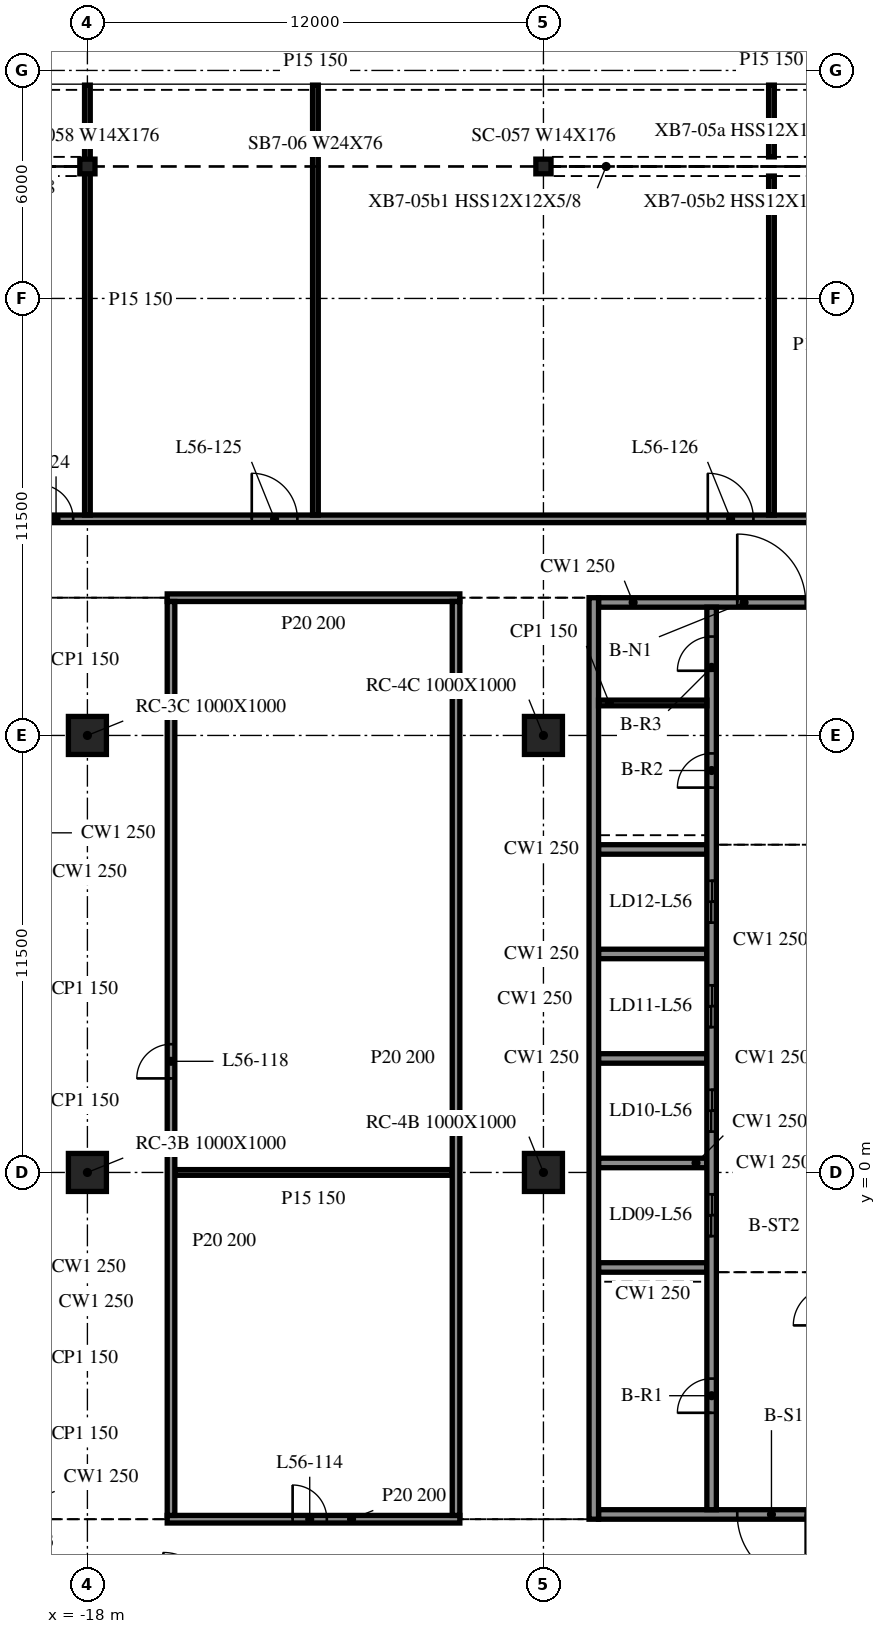
"""IFC4 building model, lengths in metres.
Left out: names, types, materials, properties, quantities, classifications, styles, units other than length and angle.
Written with IfcOpenShell. Run it as: python <this file> out.ifc"""

import sys

from ifc_helpers import new_model, si_unit, direction, frame, frame_2d, origin, origin_2d, place, context, subcontext, project, spatial, rectangle, i_section, extrude, element, fill, save


model = new_model("IFC4")
c1 = context("Model", 3, precision=1e-05, world=origin(), true_north=direction((0.0, 1.0)))
c2 = subcontext(c1, "Body", "Model", "MODEL_VIEW")
j1 = project(units=[si_unit("LENGTHUNIT", "METRE"), si_unit("PLANEANGLEUNIT", "RADIAN")], contexts=[c1])
p1 = place(None, origin())
s1 = spatial("IfcSite", under=j1, at=p1, CompositionType="ELEMENT")
p2 = place(p1, origin())
s2 = spatial("IfcBuilding", under=s1, at=p2, CompositionType="ELEMENT")
p3 = place(p2, frame((0.0, 0.0, 232.4)))
s3 = spatial("IfcBuildingStorey", under=s2, at=p3, CompositionType="ELEMENT", Elevation=232.4)
for number, where, z_axis, x_axis in (
    (1, (-18.0, 0.0, -0.34), (0.0, 0.0, 1.0), (1.0, 0.0, 0.0)),
    (2, (-18.0, 11.5, -0.34), (0.0, 0.0, 1.0), (1.0, 0.0, 0.0)),
    (3, (-6.0, 0.0, -0.34), (0.0, 0.0, 1.0), (1.0, 0.0, 0.0)),
    (4, (-6.0, 11.5, -0.34), (0.0, 0.0, 1.0), (1.0, 0.0, 0.0)),
):
    element("IfcColumn", number, at=place(p3, frame(where, z_axis=z_axis, x_axis=x_axis)), inside=s3, PredefinedType="COLUMN", context=c2, shape_type="SweptSolid", body=[
        extrude(rectangle(XDim=1.0, YDim=1.0, at=origin_2d()), origin(), (0.0, 0.0, 1.0), 3.8),
    ])
for number, where, z_axis, x_axis in (
    (5, (-6.0, 26.473, -0.34), (0.0, 0.0, 1.0), (1.0, 0.0, 0.0)),
    (6, (-18.0, 26.473, -0.34), (0.0, 0.0, 1.0), (1.0, 0.0, 0.0)),
):
    element("IfcColumn", number, at=place(p3, frame(where, z_axis=z_axis, x_axis=x_axis)), inside=s3, PredefinedType="COLUMN", context=c2, shape_type="SweptSolid", body=[
        extrude(i_section(OverallWidth=0.399, OverallDepth=0.386, WebThickness=0.021, FlangeThickness=0.033, at=origin_2d()), origin(), (0.0, 0.0, 1.0), 3.8),
    ])
p4 = place(p3, frame((-4.675, 15.125, 0.0), z_axis=(0.0, 0.0, 1.0), x_axis=(0.0, -1.0, 0.0)))
e7 = element("IfcWall", 7, at=p4, inside=s3, PredefinedType="SOLIDWALL", context=c2, shape_type="SweptSolid", body=[
    extrude(rectangle(XDim=24.25, YDim=0.25, at=frame_2d((12.125, 0.0))), origin(), (0.0, 0.0, 1.0), 3.46),
])
p5 = place(p3, frame((4.55, -9.0, 0.0), z_axis=(0.0, 0.0, 1.0), x_axis=(-1.0, 0.0, 0.0)))
e8 = element("IfcWall", 8, at=p5, inside=s3, PredefinedType="SOLIDWALL", context=c2, shape_type="SweptSolid", body=[
    extrude(rectangle(XDim=9.1, YDim=0.25, at=frame_2d((4.55, 0.0))), origin(), (0.0, 0.0, 1.0), 3.46),
])
p6 = place(p5, frame((3.65, 0.0, 0.0)))
e9 = element("IfcOpeningElement", 9, at=p6, cuts=e8, PredefinedType="OPENING", context=c2, shape_type="SweptSolid", body=[
    extrude(rectangle(XDim=1.8, YDim=2.1, at=frame_2d((0.9, 1.05))), frame((0.0, 0.135, 0.0), z_axis=(0.0, -1.0, 0.0), x_axis=(1.0, 0.0, 0.0)), (0.0, 0.0, 1.0), 0.27),
])
p7 = place(p3, frame((-4.55, 15.0, 0.0), z_axis=(0.0, 0.0, 1.0), x_axis=(1.0, 0.0, 0.0)))
e10 = element("IfcWall", 10, at=p7, inside=s3, PredefinedType="SOLIDWALL", context=c2, shape_type="SweptSolid", body=[
    extrude(rectangle(XDim=9.1, YDim=0.25, at=frame_2d((4.55, 0.0))), origin(), (0.0, 0.0, 1.0), 3.46),
])
p8 = place(p7, frame((3.65, 0.0, 0.0)))
e11 = element("IfcOpeningElement", 11, at=p8, cuts=e10, PredefinedType="OPENING", context=c2, shape_type="SweptSolid", body=[
    extrude(rectangle(XDim=1.8, YDim=2.1, at=frame_2d((0.9, 1.05))), frame((0.0, 0.135, 0.0), z_axis=(0.0, -1.0, 0.0), x_axis=(1.0, 0.0, 0.0)), (0.0, 0.0, 1.0), 0.27),
])
p9 = place(p3, frame((-1.575, -8.875, 0.0), z_axis=(0.0, 0.0, 1.0), x_axis=(0.0, 1.0, 0.0)))
e12 = element("IfcWall", 12, at=p9, inside=s3, PredefinedType="SOLIDWALL", context=c2, shape_type="SweptSolid", body=[
    extrude(rectangle(XDim=23.75, YDim=0.25, at=frame_2d((11.875, 0.0))), origin(), (0.0, 0.0, 1.0), 3.46),
])
p10 = place(p9, frame((7.2, 0.0, 0.0)))
e13 = element("IfcOpeningElement", 13, at=p10, cuts=e12, PredefinedType="OPENING", context=c2, shape_type="SweptSolid", body=[
    extrude(rectangle(XDim=1.1, YDim=2.1, at=frame_2d((0.55, 1.05))), frame((0.0, 0.135, 0.0), z_axis=(0.0, -1.0, 0.0), x_axis=(1.0, 0.0, 0.0)), (0.0, 0.0, 1.0), 0.27),
])
p11 = place(p9, frame((9.95, 0.0, 0.0)))
e14 = element("IfcOpeningElement", 14, at=p11, cuts=e12, PredefinedType="OPENING", context=c2, shape_type="SweptSolid", body=[
    extrude(rectangle(XDim=1.1, YDim=2.1, at=frame_2d((0.55, 1.05))), frame((0.0, 0.135, 0.0), z_axis=(0.0, -1.0, 0.0), x_axis=(1.0, 0.0, 0.0)), (0.0, 0.0, 1.0), 0.27),
])
p12 = place(p9, frame((12.7, 0.0, 0.0)))
e15 = element("IfcOpeningElement", 15, at=p12, cuts=e12, PredefinedType="OPENING", context=c2, shape_type="SweptSolid", body=[
    extrude(rectangle(XDim=1.1, YDim=2.1, at=frame_2d((0.55, 1.05))), frame((0.0, 0.135, 0.0), z_axis=(0.0, -1.0, 0.0), x_axis=(1.0, 0.0, 0.0)), (0.0, 0.0, 1.0), 0.27),
])
p13 = place(p9, frame((15.45, 0.0, 0.0)))
e16 = element("IfcOpeningElement", 16, at=p13, cuts=e12, PredefinedType="OPENING", context=c2, shape_type="SweptSolid", body=[
    extrude(rectangle(XDim=1.1, YDim=2.1, at=frame_2d((0.55, 1.05))), frame((0.0, 0.135, 0.0), z_axis=(0.0, -1.0, 0.0), x_axis=(1.0, 0.0, 0.0)), (0.0, 0.0, 1.0), 0.27),
])
p14 = place(p9, frame((2.55, 0.0, 0.0)))
e17 = element("IfcOpeningElement", 17, at=p14, cuts=e12, PredefinedType="OPENING", context=c2, shape_type="SweptSolid", body=[
    extrude(rectangle(XDim=0.9, YDim=2.1, at=frame_2d((0.45, 1.05))), frame((0.0, 0.135, 0.0), z_axis=(0.0, -1.0, 0.0), x_axis=(1.0, 0.0, 0.0)), (0.0, 0.0, 1.0), 0.27),
])
p15 = place(p9, frame((19.002, 0.0, 0.0)))
e18 = element("IfcOpeningElement", 18, at=p15, cuts=e12, PredefinedType="OPENING", context=c2, shape_type="SweptSolid", body=[
    extrude(rectangle(XDim=0.9, YDim=2.1, at=frame_2d((0.45, 1.05))), frame((0.0, 0.135, 0.0), z_axis=(0.0, -1.0, 0.0), x_axis=(1.0, 0.0, 0.0)), (0.0, 0.0, 1.0), 0.27),
])
p16 = place(p9, frame((22.077, 0.0, 0.0)))
e19 = element("IfcOpeningElement", 19, at=p16, cuts=e12, PredefinedType="OPENING", context=c2, shape_type="SweptSolid", body=[
    extrude(rectangle(XDim=0.9, YDim=2.1, at=frame_2d((0.45, 1.05))), frame((0.0, 0.135, 0.0), z_axis=(0.0, -1.0, 0.0), x_axis=(1.0, 0.0, 0.0)), (0.0, 0.0, 1.0), 0.27),
])
for number, where, z_axis, x_axis in (
    (20, (-4.55, -2.5, 0.0), (0.0, 0.0, 1.0), (1.0, 0.0, 0.0)),
    (21, (-4.55, 0.25, 0.0), (0.0, 0.0, 1.0), (1.0, 0.0, 0.0)),
    (22, (-4.55, 3.0, 0.0), (0.0, 0.0, 1.0), (1.0, 0.0, 0.0)),
    (23, (-4.55, 5.75, 0.0), (0.0, 0.0, 1.0), (1.0, 0.0, 0.0)),
    (24, (-4.55, 8.5, 0.0), (0.0, 0.0, 1.0), (1.0, 0.0, 0.0)),
):
    element("IfcWall", number, at=place(p3, frame(where, z_axis=z_axis, x_axis=x_axis)), inside=s3, PredefinedType="SOLIDWALL", context=c2, shape_type="SweptSolid", body=[
        extrude(rectangle(XDim=2.85, YDim=0.25, at=frame_2d((1.425, 0.0))), origin(), (0.0, 0.0, 1.0), 3.46),
    ])
p17 = place(p3, frame((-4.55, 12.355, 0.0), z_axis=(0.0, 0.0, 1.0), x_axis=(1.0, 0.0, 0.0)))
e25 = element("IfcWall", 25, at=p17, inside=s3, PredefinedType="PARTITIONING", context=c2, shape_type="SweptSolid", body=[
    extrude(rectangle(XDim=2.85, YDim=0.15, at=frame_2d((1.425, 0.0))), origin(), (0.0, 0.0, 1.0), 3.46),
])
p18 = place(p3, frame((-15.9, -9.125, 0.0), z_axis=(0.0, 0.0, 1.0), x_axis=(1.0, 0.0, 0.0)))
e26 = element("IfcWall", 26, at=p18, inside=s3, PredefinedType="PARTITIONING", context=c2, shape_type="SweptSolid", body=[
    extrude(rectangle(XDim=7.7, YDim=0.2, at=frame_2d((3.85, 0.0))), origin(), (0.0, 0.0, 1.0), 3.46),
])
p19 = place(p18, frame((3.3, 0.0, 0.0)))
e27 = element("IfcOpeningElement", 27, at=p19, cuts=e26, PredefinedType="OPENING", context=c2, shape_type="SweptSolid", body=[
    extrude(rectangle(XDim=0.9, YDim=2.1, at=frame_2d((0.45, 1.05))), frame((0.0, 0.11, 0.0), z_axis=(0.0, -1.0, 0.0), x_axis=(1.0, 0.0, 0.0)), (0.0, 0.0, 1.0), 0.22),
])
p20 = place(p3, frame((-15.7, 0.0, 0.0), z_axis=(0.0, 0.0, 1.0), x_axis=(1.0, 0.0, 0.0)))
e28 = element("IfcWall", 28, at=p20, inside=s3, PredefinedType="PARTITIONING", context=c2, shape_type="SweptSolid", body=[
    extrude(rectangle(XDim=7.3, YDim=0.15, at=frame_2d((3.65, 0.0))), origin(), (0.0, 0.0, 1.0), 3.46),
])
p21 = place(p3, frame((-15.9, 15.125, 0.0), z_axis=(0.0, 0.0, 1.0), x_axis=(1.0, 0.0, 0.0)))
e29 = element("IfcWall", 29, at=p21, inside=s3, PredefinedType="PARTITIONING", context=c2, shape_type="SweptSolid", body=[
    extrude(rectangle(XDim=7.7, YDim=0.2, at=frame_2d((3.85, 0.0))), origin(), (0.0, 0.0, 1.0), 3.46),
])
p22 = place(p3, frame((-41.975, 17.2, 0.0), z_axis=(0.0, 0.0, 1.0), x_axis=(1.0, 0.0, 0.0)))
e30 = element("IfcWall", 30, at=p22, inside=s3, PredefinedType="PARTITIONING", context=c2, shape_type="SweptSolid", body=[
    extrude(rectangle(XDim=95.95, YDim=0.2, at=frame_2d((47.975, 0.0))), origin(), (0.0, 0.0, 1.0), 3.46),
])
p23 = place(p22, frame((10.7, 0.0, 0.0)))
e31 = element("IfcOpeningElement", 31, at=p23, cuts=e30, PredefinedType="OPENING", context=c2, shape_type="SweptSolid", body=[
    extrude(rectangle(XDim=0.9, YDim=2.1, at=frame_2d((0.45, 1.05))), frame((0.0, 0.11, 0.0), z_axis=(0.0, -1.0, 0.0), x_axis=(1.0, 0.0, 0.0)), (0.0, 0.0, 1.0), 0.22),
])
p24 = place(p22, frame((13.3, 0.0, 0.0)))
e32 = element("IfcOpeningElement", 32, at=p24, cuts=e30, PredefinedType="OPENING", context=c2, shape_type="SweptSolid", body=[
    extrude(rectangle(XDim=1.2, YDim=2.1, at=frame_2d((0.6, 1.05))), frame((0.0, 0.11, 0.0), z_axis=(0.0, -1.0, 0.0), x_axis=(1.0, 0.0, 0.0)), (0.0, 0.0, 1.0), 0.22),
])
p25 = place(p22, frame((22.7, 0.0, 0.0)))
e33 = element("IfcOpeningElement", 33, at=p25, cuts=e30, PredefinedType="OPENING", context=c2, shape_type="SweptSolid", body=[
    extrude(rectangle(XDim=0.9, YDim=2.1, at=frame_2d((0.45, 1.05))), frame((0.0, 0.11, 0.0), z_axis=(0.0, -1.0, 0.0), x_axis=(1.0, 0.0, 0.0)), (0.0, 0.0, 1.0), 0.22),
])
p26 = place(p22, frame((28.3, 0.0, 0.0)))
e34 = element("IfcOpeningElement", 34, at=p26, cuts=e30, PredefinedType="OPENING", context=c2, shape_type="SweptSolid", body=[
    extrude(rectangle(XDim=1.2, YDim=2.1, at=frame_2d((0.6, 1.05))), frame((0.0, 0.11, 0.0), z_axis=(0.0, -1.0, 0.0), x_axis=(1.0, 0.0, 0.0)), (0.0, 0.0, 1.0), 0.22),
])
p27 = place(p22, frame((40.3, 0.0, 0.0)))
e35 = element("IfcOpeningElement", 35, at=p27, cuts=e30, PredefinedType="OPENING", context=c2, shape_type="SweptSolid", body=[
    extrude(rectangle(XDim=1.2, YDim=2.1, at=frame_2d((0.6, 1.05))), frame((0.0, 0.11, 0.0), z_axis=(0.0, -1.0, 0.0), x_axis=(1.0, 0.0, 0.0)), (0.0, 0.0, 1.0), 0.22),
])
p28 = place(p22, frame((43.7, 0.0, 0.0)))
e36 = element("IfcOpeningElement", 36, at=p28, cuts=e30, PredefinedType="OPENING", context=c2, shape_type="SweptSolid", body=[
    extrude(rectangle(XDim=0.9, YDim=2.1, at=frame_2d((0.45, 1.05))), frame((0.0, 0.11, 0.0), z_axis=(0.0, -1.0, 0.0), x_axis=(1.0, 0.0, 0.0)), (0.0, 0.0, 1.0), 0.22),
])
p29 = place(p22, frame((47.3, 0.0, 0.0)))
e37 = element("IfcOpeningElement", 37, at=p29, cuts=e30, PredefinedType="OPENING", context=c2, shape_type="SweptSolid", body=[
    extrude(rectangle(XDim=1.2, YDim=2.1, at=frame_2d((0.6, 1.05))), frame((0.0, 0.11, 0.0), z_axis=(0.0, -1.0, 0.0), x_axis=(1.0, 0.0, 0.0)), (0.0, 0.0, 1.0), 0.22),
])
p30 = place(p22, frame((54.1, 0.0, 0.0)))
e38 = element("IfcOpeningElement", 38, at=p30, cuts=e30, PredefinedType="OPENING", context=c2, shape_type="SweptSolid", body=[
    extrude(rectangle(XDim=0.9, YDim=2.1, at=frame_2d((0.45, 1.05))), frame((0.0, 0.11, 0.0), z_axis=(0.0, -1.0, 0.0), x_axis=(1.0, 0.0, 0.0)), (0.0, 0.0, 1.0), 0.22),
])
p31 = place(p22, frame((60.1, 0.0, 0.0)))
e39 = element("IfcOpeningElement", 39, at=p31, cuts=e30, PredefinedType="OPENING", context=c2, shape_type="SweptSolid", body=[
    extrude(rectangle(XDim=1.2, YDim=2.1, at=frame_2d((0.6, 1.05))), frame((0.0, 0.11, 0.0), z_axis=(0.0, -1.0, 0.0), x_axis=(1.0, 0.0, 0.0)), (0.0, 0.0, 1.0), 0.22),
])
p32 = place(p22, frame((72.1, 0.0, 0.0)))
e40 = element("IfcOpeningElement", 40, at=p32, cuts=e30, PredefinedType="OPENING", context=c2, shape_type="SweptSolid", body=[
    extrude(rectangle(XDim=1.2, YDim=2.1, at=frame_2d((0.6, 1.05))), frame((0.0, 0.11, 0.0), z_axis=(0.0, -1.0, 0.0), x_axis=(1.0, 0.0, 0.0)), (0.0, 0.0, 1.0), 0.22),
])
p33 = place(p22, frame((75.1, 0.0, 0.0)))
e41 = element("IfcOpeningElement", 41, at=p33, cuts=e30, PredefinedType="OPENING", context=c2, shape_type="SweptSolid", body=[
    extrude(rectangle(XDim=0.9, YDim=2.1, at=frame_2d((0.45, 1.05))), frame((0.0, 0.11, 0.0), z_axis=(0.0, -1.0, 0.0), x_axis=(1.0, 0.0, 0.0)), (0.0, 0.0, 1.0), 0.22),
])
p34 = place(p22, frame((84.1, 0.0, 0.0)))
e42 = element("IfcOpeningElement", 42, at=p34, cuts=e30, PredefinedType="OPENING", context=c2, shape_type="SweptSolid", body=[
    extrude(rectangle(XDim=1.2, YDim=2.1, at=frame_2d((0.6, 1.05))), frame((0.0, 0.11, 0.0), z_axis=(0.0, -1.0, 0.0), x_axis=(1.0, 0.0, 0.0)), (0.0, 0.0, 1.0), 0.22),
])
p35 = place(p22, frame((90.1, 0.0, 0.0)))
e43 = element("IfcOpeningElement", 43, at=p35, cuts=e30, PredefinedType="OPENING", context=c2, shape_type="SweptSolid", body=[
    extrude(rectangle(XDim=0.9, YDim=2.1, at=frame_2d((0.45, 1.05))), frame((0.0, 0.11, 0.0), z_axis=(0.0, -1.0, 0.0), x_axis=(1.0, 0.0, 0.0)), (0.0, 0.0, 1.0), 0.22),
])
p36 = place(p3, frame((-18.0, 17.3, 0.0), z_axis=(0.0, 0.0, 1.0), x_axis=(0.0, 1.0, 0.0)))
e44 = element("IfcWall", 44, at=p36, inside=s3, PredefinedType="PARTITIONING", context=c2, shape_type="SweptSolid", body=[
    extrude(rectangle(XDim=11.314, YDim=0.15, at=frame_2d((5.657, 0.0))), origin(), (0.0, 0.0, 1.0), 3.46),
])
p37 = place(p3, frame((-15.8, -9.025, 0.0), z_axis=(0.0, 0.0, 1.0), x_axis=(0.0, 1.0, 0.0)))
e45 = element("IfcWall", 45, at=p37, inside=s3, PredefinedType="PARTITIONING", context=c2, shape_type="SweptSolid", body=[
    extrude(rectangle(XDim=24.05, YDim=0.2, at=frame_2d((12.025, 0.0))), origin(), (0.0, 0.0, 1.0), 3.46),
])
p38 = place(p37, frame((11.5, 0.0, 0.0)))
e46 = element("IfcOpeningElement", 46, at=p38, cuts=e45, PredefinedType="OPENING", context=c2, shape_type="SweptSolid", body=[
    extrude(rectangle(XDim=0.9, YDim=2.1, at=frame_2d((0.45, 1.05))), frame((0.0, 0.11, 0.0), z_axis=(0.0, -1.0, 0.0), x_axis=(1.0, 0.0, 0.0)), (0.0, 0.0, 1.0), 0.22),
])
p39 = place(p3, frame((-12.0, 17.3, 0.0), z_axis=(0.0, 0.0, 1.0), x_axis=(0.0, 1.0, 0.0)))
e47 = element("IfcWall", 47, at=p39, inside=s3, PredefinedType="PARTITIONING", context=c2, shape_type="SweptSolid", body=[
    extrude(rectangle(XDim=11.314, YDim=0.15, at=frame_2d((5.657, 0.0))), origin(), (0.0, 0.0, 1.0), 3.46),
])
p40 = place(p3, frame((-8.3, -9.025, 0.0), z_axis=(0.0, 0.0, 1.0), x_axis=(0.0, 1.0, 0.0)))
e48 = element("IfcWall", 48, at=p40, inside=s3, PredefinedType="PARTITIONING", context=c2, shape_type="SweptSolid", body=[
    extrude(rectangle(XDim=24.05, YDim=0.2, at=frame_2d((12.025, 0.0))), origin(), (0.0, 0.0, 1.0), 3.46),
])
p41 = place(p3, frame((0.0, 17.3, 0.0), z_axis=(0.0, 0.0, 1.0), x_axis=(0.0, 1.0, 0.0)))
e49 = element("IfcWall", 49, at=p41, inside=s3, PredefinedType="PARTITIONING", context=c2, shape_type="SweptSolid", body=[
    extrude(rectangle(XDim=8.921, YDim=0.15, at=frame_2d((4.46, 0.0))), origin(), (0.0, 0.0, 1.0), 3.46),
])
p42 = place(p3, frame((0.0, 26.725, 0.0), z_axis=(0.0, 0.0, 1.0), x_axis=(0.0, 1.0, 0.0)))
e50 = element("IfcWall", 50, at=p42, inside=s3, PredefinedType="PARTITIONING", context=c2, shape_type="SweptSolid", body=[
    extrude(rectangle(XDim=1.889, YDim=0.15, at=frame_2d((0.944, 0.0))), origin(), (0.0, 0.0, 1.0), 3.46),
])
p43 = place(p6, origin())
e51 = element("IfcDoor", 51, at=p43, inside=s3, OperationType="DOUBLE_DOOR_SINGLE_SWING", PredefinedType="DOOR", context=c2, shape_type="SweptSolid", body=[
    extrude(rectangle(XDim=1.8, YDim=2.1, at=frame_2d((0.9, 1.05))), frame((0.0, 0.025, 0.0), z_axis=(0.0, -1.0, 0.0), x_axis=(1.0, 0.0, 0.0)), (0.0, 0.0, 1.0), 0.05),
])
fill(e9, e51)
p44 = place(p8, origin())
e52 = element("IfcDoor", 52, at=p44, inside=s3, OperationType="DOUBLE_DOOR_SINGLE_SWING", PredefinedType="DOOR", context=c2, shape_type="SweptSolid", body=[
    extrude(rectangle(XDim=1.8, YDim=2.1, at=frame_2d((0.9, 1.05))), frame((0.0, 0.025, 0.0), z_axis=(0.0, -1.0, 0.0), x_axis=(1.0, 0.0, 0.0)), (0.0, 0.0, 1.0), 0.05),
])
fill(e11, e52)
p45 = place(p10, origin())
e53 = element("IfcDoor", 53, at=p45, inside=s3, OperationType="DOUBLE_DOOR_SLIDING", PredefinedType="DOOR", context=c2, shape_type="SweptSolid", body=[
    extrude(rectangle(XDim=1.1, YDim=2.1, at=frame_2d((0.55, 1.05))), frame((0.0, 0.025, 0.0), z_axis=(0.0, -1.0, 0.0), x_axis=(1.0, 0.0, 0.0)), (0.0, 0.0, 1.0), 0.05),
])
fill(e13, e53)
p46 = place(p11, origin())
e54 = element("IfcDoor", 54, at=p46, inside=s3, OperationType="DOUBLE_DOOR_SLIDING", PredefinedType="DOOR", context=c2, shape_type="SweptSolid", body=[
    extrude(rectangle(XDim=1.1, YDim=2.1, at=frame_2d((0.55, 1.05))), frame((0.0, 0.025, 0.0), z_axis=(0.0, -1.0, 0.0), x_axis=(1.0, 0.0, 0.0)), (0.0, 0.0, 1.0), 0.05),
])
fill(e14, e54)
p47 = place(p12, origin())
e55 = element("IfcDoor", 55, at=p47, inside=s3, OperationType="DOUBLE_DOOR_SLIDING", PredefinedType="DOOR", context=c2, shape_type="SweptSolid", body=[
    extrude(rectangle(XDim=1.1, YDim=2.1, at=frame_2d((0.55, 1.05))), frame((0.0, 0.025, 0.0), z_axis=(0.0, -1.0, 0.0), x_axis=(1.0, 0.0, 0.0)), (0.0, 0.0, 1.0), 0.05),
])
fill(e15, e55)
p48 = place(p13, origin())
e56 = element("IfcDoor", 56, at=p48, inside=s3, OperationType="DOUBLE_DOOR_SLIDING", PredefinedType="DOOR", context=c2, shape_type="SweptSolid", body=[
    extrude(rectangle(XDim=1.1, YDim=2.1, at=frame_2d((0.55, 1.05))), frame((0.0, 0.025, 0.0), z_axis=(0.0, -1.0, 0.0), x_axis=(1.0, 0.0, 0.0)), (0.0, 0.0, 1.0), 0.05),
])
fill(e16, e56)
p49 = place(p14, origin())
e57 = element("IfcDoor", 57, at=p49, inside=s3, OperationType="SINGLE_SWING_LEFT", PredefinedType="DOOR", context=c2, shape_type="SweptSolid", body=[
    extrude(rectangle(XDim=0.9, YDim=2.1, at=frame_2d((0.45, 1.05))), frame((0.0, 0.025, 0.0), z_axis=(0.0, -1.0, 0.0), x_axis=(1.0, 0.0, 0.0)), (0.0, 0.0, 1.0), 0.05),
])
fill(e17, e57)
p50 = place(p15, origin())
e58 = element("IfcDoor", 58, at=p50, inside=s3, OperationType="SINGLE_SWING_RIGHT", PredefinedType="DOOR", context=c2, shape_type="SweptSolid", body=[
    extrude(rectangle(XDim=0.9, YDim=2.1, at=frame_2d((0.45, 1.05))), frame((0.0, 0.025, 0.0), z_axis=(0.0, -1.0, 0.0), x_axis=(1.0, 0.0, 0.0)), (0.0, 0.0, 1.0), 0.05),
])
fill(e18, e58)
p51 = place(p16, origin())
e59 = element("IfcDoor", 59, at=p51, inside=s3, OperationType="SINGLE_SWING_LEFT", PredefinedType="DOOR", context=c2, shape_type="SweptSolid", body=[
    extrude(rectangle(XDim=0.9, YDim=2.1, at=frame_2d((0.45, 1.05))), frame((0.0, 0.025, 0.0), z_axis=(0.0, -1.0, 0.0), x_axis=(1.0, 0.0, 0.0)), (0.0, 0.0, 1.0), 0.05),
])
fill(e19, e59)
p52 = place(p19, origin())
e60 = element("IfcDoor", 60, at=p52, inside=s3, OperationType="SINGLE_SWING_LEFT", PredefinedType="DOOR", context=c2, shape_type="SweptSolid", body=[
    extrude(rectangle(XDim=0.9, YDim=2.1, at=frame_2d((0.45, 1.05))), frame((0.0, 0.025, 0.0), z_axis=(0.0, -1.0, 0.0), x_axis=(1.0, 0.0, 0.0)), (0.0, 0.0, 1.0), 0.05),
])
fill(e27, e60)
p53 = place(p38, origin())
e61 = element("IfcDoor", 61, at=p53, inside=s3, OperationType="SINGLE_SWING_RIGHT", PredefinedType="DOOR", context=c2, shape_type="SweptSolid", body=[
    extrude(rectangle(XDim=0.9, YDim=2.1, at=frame_2d((0.45, 1.05))), frame((0.0, 0.025, 0.0), z_axis=(0.0, -1.0, 0.0), x_axis=(1.0, 0.0, 0.0)), (0.0, 0.0, 1.0), 0.05),
])
fill(e46, e61)
p54 = place(p25, origin())
e62 = element("IfcDoor", 62, at=p54, inside=s3, OperationType="SINGLE_SWING_LEFT", PredefinedType="DOOR", context=c2, shape_type="SweptSolid", body=[
    extrude(rectangle(XDim=0.9, YDim=2.1, at=frame_2d((0.45, 1.05))), frame((0.0, 0.025, 0.0), z_axis=(0.0, -1.0, 0.0), x_axis=(1.0, 0.0, 0.0)), (0.0, 0.0, 1.0), 0.05),
])
fill(e33, e62)
p55 = place(p26, origin())
e63 = element("IfcDoor", 63, at=p55, inside=s3, OperationType="SINGLE_SWING_LEFT", PredefinedType="DOOR", context=c2, shape_type="SweptSolid", body=[
    extrude(rectangle(XDim=1.2, YDim=2.1, at=frame_2d((0.6, 1.05))), frame((0.0, 0.025, 0.0), z_axis=(0.0, -1.0, 0.0), x_axis=(1.0, 0.0, 0.0)), (0.0, 0.0, 1.0), 0.05),
])
fill(e34, e63)
p56 = place(p27, origin())
e64 = element("IfcDoor", 64, at=p56, inside=s3, OperationType="SINGLE_SWING_LEFT", PredefinedType="DOOR", context=c2, shape_type="SweptSolid", body=[
    extrude(rectangle(XDim=1.2, YDim=2.1, at=frame_2d((0.6, 1.05))), frame((0.0, 0.025, 0.0), z_axis=(0.0, -1.0, 0.0), x_axis=(1.0, 0.0, 0.0)), (0.0, 0.0, 1.0), 0.05),
])
fill(e35, e64)
save(model, sys.argv[1])
